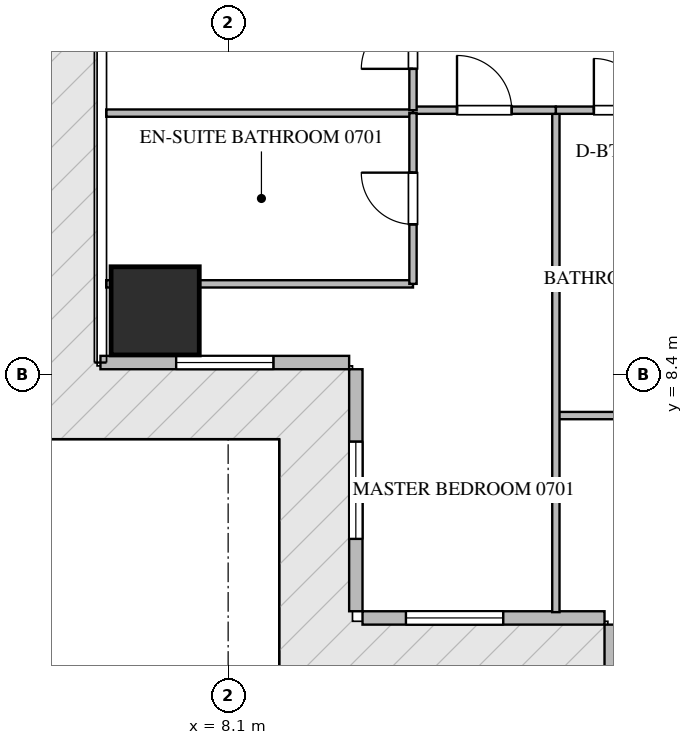
"""IFC4 building model, lengths in metres.
Left out: names, types, materials, properties, quantities, classifications, styles, units other than length and angle.
Written with IfcOpenShell. Run it as: python <this file> out.ifc"""

import sys

from ifc_helpers import new_model, si_unit, direction, frame, frame_2d, origin, origin_2d, place, context, subcontext, project, spatial, rectangle, extrude, source, transform, mapped, element, fill, save


model = new_model("IFC4")
c1 = context("Model", 3, precision=1e-05, world=origin(), true_north=direction((0.0, 1.0)))
c2 = subcontext(c1, "Body", "Model", "MODEL_VIEW")
j1 = project(units=[si_unit("LENGTHUNIT", "METRE"), si_unit("PLANEANGLEUNIT", "RADIAN")], contexts=[c1])
p1 = place(None, origin())
s1 = spatial("IfcSite", under=j1, at=p1, CompositionType="ELEMENT")
p2 = place(p1, origin())
s2 = spatial("IfcBuilding", under=s1, at=p2, CompositionType="ELEMENT")
p3 = place(p2, frame((0.0, 0.0, 34.2)))
s3 = spatial("IfcBuildingStorey", under=s2, at=p3, CompositionType="ELEMENT", Elevation=34.2)
m1 = source(origin(), c2, "Body", "SweptSolid", [
    extrude(rectangle(XDim=1.45, YDim=1.45, at=origin_2d()), origin(), (0.0, 0.0, 1.0), 3.75),
])
p4 = place(p3, frame((6.9, 9.45, -0.26), z_axis=(0.0, 0.0, 1.0), x_axis=(1.0, 0.0, 0.0)))
e1 = element("IfcColumn", 1, at=p4, inside=s3, PredefinedType="COLUMN", context=c2, shape_type="MappedRepresentation", body=[
    mapped(m1, transform((0.0, 0.0, 0.0), scale=1.0)),
])
p5 = place(p3, frame((6.0, 8.6, 0.0), z_axis=(0.0, 0.0, 1.0), x_axis=(1.0, 0.0, 0.0)))
e2 = element("IfcWall", 2, at=p5, inside=s3, PredefinedType="ELEMENTEDWALL", context=c2, shape_type="SweptSolid", body=[
    extrude(rectangle(XDim=4.09, YDim=0.22, at=frame_2d((2.045, 0.0))), origin(), (0.0, 0.0, 1.0), 3.475),
])
p6 = place(p5, frame((1.245, 0.0, 0.65)))
e3 = element("IfcOpeningElement", 3, at=p6, cuts=e2, PredefinedType="OPENING", context=c2, shape_type="SweptSolid", body=[
    extrude(rectangle(XDim=1.6, YDim=2.1, at=frame_2d((0.8, 1.05))), frame((0.0, 0.12, 0.0), z_axis=(0.0, -1.0, 0.0), x_axis=(1.0, 0.0, 0.0)), (0.0, 0.0, 1.0), 0.24),
])
p7 = place(p3, frame((10.2, 8.49, 0.0), z_axis=(0.0, 0.0, 1.0), x_axis=(0.0, -1.0, 0.0)))
e4 = element("IfcWall", 4, at=p7, inside=s3, PredefinedType="ELEMENTEDWALL", context=c2, shape_type="SweptSolid", body=[
    extrude(rectangle(XDim=3.98, YDim=0.22, at=frame_2d((1.99, 0.0))), origin(), (0.0, 0.0, 1.0), 3.475),
])
p8 = place(p7, frame((1.19, 0.0, 0.65)))
e5 = element("IfcOpeningElement", 5, at=p8, cuts=e4, PredefinedType="OPENING", context=c2, shape_type="SweptSolid", body=[
    extrude(rectangle(XDim=1.6, YDim=2.1, at=frame_2d((0.8, 1.05))), frame((0.0, 0.12, 0.0), z_axis=(0.0, -1.0, 0.0), x_axis=(1.0, 0.0, 0.0)), (0.0, 0.0, 1.0), 0.24),
])
p9 = place(p3, frame((10.31, 4.4, 0.0), z_axis=(0.0, 0.0, 1.0), x_axis=(1.0, 0.0, 0.0)))
e6 = element("IfcWall", 6, at=p9, inside=s3, PredefinedType="ELEMENTEDWALL", context=c2, shape_type="SweptSolid", body=[
    extrude(rectangle(XDim=3.98, YDim=0.22, at=frame_2d((1.99, 0.0))), origin(), (0.0, 0.0, 1.0), 3.475),
])
p10 = place(p9, frame((0.714, 0.0, 0.65)))
e7 = element("IfcOpeningElement", 7, at=p10, cuts=e6, PredefinedType="OPENING", context=c2, shape_type="SweptSolid", body=[
    extrude(rectangle(XDim=1.6, YDim=2.1, at=frame_2d((0.8, 1.05))), frame((0.0, 0.12, 0.0), z_axis=(0.0, -1.0, 0.0), x_axis=(1.0, 0.0, 0.0)), (0.0, 0.0, 1.0), 0.24),
])
p11 = place(p3, frame((14.4, 4.29, 0.0), z_axis=(0.0, 0.0, 1.0), x_axis=(0.0, -1.0, 0.0)))
e8 = element("IfcWall", 8, at=p11, inside=s3, PredefinedType="ELEMENTEDWALL", context=c2, shape_type="SweptSolid", body=[
    extrude(rectangle(XDim=4.09, YDim=0.22, at=frame_2d((2.045, 0.0))), origin(), (0.0, 0.0, 1.0), 3.475),
])
p12 = place(p11, frame((1.245, 0.0, 0.65)))
e9 = element("IfcOpeningElement", 9, at=p12, cuts=e8, PredefinedType="OPENING", context=c2, shape_type="SweptSolid", body=[
    extrude(rectangle(XDim=1.6, YDim=2.1, at=frame_2d((0.8, 1.05))), frame((0.0, 0.12, 0.0), z_axis=(0.0, -1.0, 0.0), x_axis=(1.0, 0.0, 0.0)), (0.0, 0.0, 1.0), 0.24),
])
p13 = place(p3, frame((13.49, 7.728, 0.0), z_axis=(0.0, 0.0, 1.0), x_axis=(1.0, 0.0, 0.0)))
e10 = element("IfcWall", 10, at=p13, inside=s3, PredefinedType="PARTITIONING", context=c2, shape_type="SweptSolid", body=[
    extrude(rectangle(XDim=5.15, YDim=0.12, at=frame_2d((2.575, 0.0))), origin(), (0.0, 0.0, 1.0), 3.49),
])
p14 = place(p3, frame((13.49, 4.495, 0.0), z_axis=(0.0, 0.0, 1.0), x_axis=(0.0, 1.0, 0.0)))
e11 = element("IfcWall", 11, at=p14, inside=s3, PredefinedType="PARTITIONING", context=c2, shape_type="SweptSolid", body=[
    extrude(rectangle(XDim=8.255, YDim=0.12, at=frame_2d((4.127, 0.0))), origin(), (0.0, 0.0, 1.0), 3.49),
])
p15 = place(p3, frame((13.49, 12.75, 0.0), z_axis=(0.0, 0.0, 1.0), x_axis=(1.0, 0.0, 0.0)))
e12 = element("IfcWall", 12, at=p15, inside=s3, PredefinedType="PARTITIONING", context=c2, shape_type="SweptSolid", body=[
    extrude(rectangle(XDim=2.1, YDim=0.12, at=frame_2d((1.05, 0.0))), origin(), (0.0, 0.0, 1.0), 3.49),
])
p16 = place(p15, frame((0.625, 0.0, 0.0)))
e13 = element("IfcOpeningElement", 13, at=p16, cuts=e12, PredefinedType="OPENING", context=c2, shape_type="SweptSolid", body=[
    extrude(rectangle(XDim=0.85, YDim=2.1, at=frame_2d((0.425, 1.05))), frame((0.0, 0.07, 0.0), z_axis=(0.0, -1.0, 0.0), x_axis=(1.0, 0.0, 0.0)), (0.0, 0.0, 1.0), 0.14),
])
p17 = place(p3, frame((11.14, 12.75, 0.0), z_axis=(0.0, 0.0, 1.0), x_axis=(1.0, 0.0, 0.0)))
e14 = element("IfcWall", 14, at=p17, inside=s3, PredefinedType="PARTITIONING", context=c2, shape_type="SweptSolid", body=[
    extrude(rectangle(XDim=2.348, YDim=0.12, at=frame_2d((1.174, 0.0))), origin(), (0.0, 0.0, 1.0), 3.49),
])
p18 = place(p17, frame((0.724, 0.0, 0.0)))
e15 = element("IfcOpeningElement", 15, at=p18, cuts=e14, PredefinedType="OPENING", context=c2, shape_type="SweptSolid", body=[
    extrude(rectangle(XDim=0.9, YDim=2.1, at=frame_2d((0.45, 1.05))), frame((0.0, 0.07, 0.0), z_axis=(0.0, -1.0, 0.0), x_axis=(1.0, 0.0, 0.0)), (0.0, 0.0, 1.0), 0.14),
])
p19 = place(p3, frame((6.095, 9.894, 0.0), z_axis=(0.0, 0.0, 1.0), x_axis=(1.0, 0.0, 0.0)))
e16 = element("IfcWall", 16, at=p19, inside=s3, PredefinedType="PARTITIONING", context=c2, shape_type="SweptSolid", body=[
    extrude(rectangle(XDim=5.045, YDim=0.12, at=frame_2d((2.522, 0.0))), origin(), (0.0, 0.0, 1.0), 3.49),
])
p20 = place(p3, frame((6.095, 12.702, 0.0), z_axis=(0.0, 0.0, 1.0), x_axis=(1.0, 0.0, 0.0)))
e17 = element("IfcWall", 17, at=p20, inside=s3, PredefinedType="PARTITIONING", context=c2, shape_type="SweptSolid", body=[
    extrude(rectangle(XDim=5.043, YDim=0.12, at=frame_2d((2.521, 0.0))), origin(), (0.0, 0.0, 1.0), 3.49),
])
p21 = place(p3, frame((11.14, 9.894, 0.0), z_axis=(0.0, 0.0, 1.0), x_axis=(0.0, 1.0, 0.0)))
e18 = element("IfcWall", 18, at=p21, inside=s3, PredefinedType="PARTITIONING", context=c2, shape_type="SweptSolid", body=[
    extrude(rectangle(XDim=2.808, YDim=0.12, at=frame_2d((1.404, 0.0))), origin(), (0.0, 0.0, 1.0), 3.49),
])
p22 = place(p21, frame((0.979, 0.0, 0.0)))
e19 = element("IfcOpeningElement", 19, at=p22, cuts=e18, PredefinedType="OPENING", context=c2, shape_type="SweptSolid", body=[
    extrude(rectangle(XDim=0.85, YDim=2.1, at=frame_2d((0.425, 1.05))), frame((0.0, 0.07, 0.0), z_axis=(0.0, -1.0, 0.0), x_axis=(1.0, 0.0, 0.0)), (0.0, 0.0, 1.0), 0.14),
])
p23 = place(p3, frame((11.14, 12.75, 0.0), z_axis=(0.0, 0.0, 1.0), x_axis=(0.0, 1.0, 0.0)))
e20 = element("IfcWall", 20, at=p23, inside=s3, PredefinedType="PARTITIONING", context=c2, shape_type="SweptSolid", body=[
    extrude(rectangle(XDim=2.21, YDim=0.12, at=frame_2d((1.105, 0.0))), origin(), (0.0, 0.0, 1.0), 3.49),
])
p24 = place(p23, frame((0.68, 0.0, 0.0)))
e21 = element("IfcOpeningElement", 21, at=p24, cuts=e20, PredefinedType="OPENING", context=c2, shape_type="SweptSolid", body=[
    extrude(rectangle(XDim=0.85, YDim=2.1, at=frame_2d((0.425, 1.05))), frame((0.0, 0.07, 0.0), z_axis=(0.0, -1.0, 0.0), x_axis=(1.0, 0.0, 0.0)), (0.0, 0.0, 1.0), 0.14),
])
m2 = source(origin(), c2, "Body", "SweptSolid", [
    extrude(rectangle(XDim=1.6, YDim=2.1, at=frame_2d((0.8, 1.05))), frame((0.0, 0.03, 0.0), z_axis=(0.0, -1.0, 0.0), x_axis=(1.0, 0.0, 0.0)), (0.0, 0.0, 1.0), 0.06),
])
p25 = place(p6, origin())
e22 = element("IfcWindow", 22, at=p25, inside=s3, PartitioningType="SINGLE_PANEL", PredefinedType="WINDOW", context=c2, shape_type="MappedRepresentation", body=[
    mapped(m2, transform((0.0, 0.0, 0.0), scale=1.0)),
])
fill(e3, e22)
p26 = place(p8, origin())
e23 = element("IfcWindow", 23, at=p26, inside=s3, PartitioningType="SINGLE_PANEL", PredefinedType="WINDOW", context=c2, shape_type="MappedRepresentation", body=[
    mapped(m2, transform((0.0, 0.0, 0.0), scale=1.0)),
])
fill(e5, e23)
p27 = place(p10, origin())
e24 = element("IfcWindow", 24, at=p27, inside=s3, PartitioningType="SINGLE_PANEL", PredefinedType="WINDOW", context=c2, shape_type="MappedRepresentation", body=[
    mapped(m2, transform((0.0, 0.0, 0.0), scale=1.0)),
])
fill(e7, e24)
m3 = source(origin(), c2, "Body", "SweptSolid", [
    extrude(rectangle(XDim=0.85, YDim=2.1, at=frame_2d((0.425, 1.05))), frame((0.0, 0.025, 0.0), z_axis=(0.0, -1.0, 0.0), x_axis=(1.0, 0.0, 0.0)), (0.0, 0.0, 1.0), 0.05),
])
p28 = place(p16, origin())
e25 = element("IfcDoor", 25, at=p28, inside=s3, OperationType="SINGLE_SWING_LEFT", PredefinedType="DOOR", context=c2, shape_type="MappedRepresentation", body=[
    mapped(m3, transform((0.0, 0.0, 0.0), scale=1.0)),
])
fill(e13, e25)
m4 = source(origin(), c2, "Body", "SweptSolid", [
    extrude(rectangle(XDim=0.9, YDim=2.1, at=frame_2d((0.45, 1.05))), frame((0.0, 0.025, 0.0), z_axis=(0.0, -1.0, 0.0), x_axis=(1.0, 0.0, 0.0)), (0.0, 0.0, 1.0), 0.05),
])
p29 = place(p18, origin())
e26 = element("IfcDoor", 26, at=p29, inside=s3, OperationType="SINGLE_SWING_LEFT", PredefinedType="DOOR", context=c2, shape_type="MappedRepresentation", body=[
    mapped(m4, transform((0.0, 0.0, 0.0), scale=1.0)),
])
fill(e15, e26)
p30 = place(p22, origin())
e27 = element("IfcDoor", 27, at=p30, inside=s3, OperationType="SINGLE_SWING_RIGHT", PredefinedType="DOOR", context=c2, shape_type="MappedRepresentation", body=[
    mapped(m3, transform((0.0, 0.0, 0.0), scale=1.0)),
])
fill(e19, e27)
p31 = place(p24, origin())
e28 = element("IfcDoor", 28, at=p31, inside=s3, OperationType="SINGLE_SWING_LEFT", PredefinedType="DOOR", context=c2, shape_type="MappedRepresentation", body=[
    mapped(m3, transform((0.0, 0.0, 0.0), scale=1.0)),
])
fill(e21, e28)
save(model, sys.argv[1])
